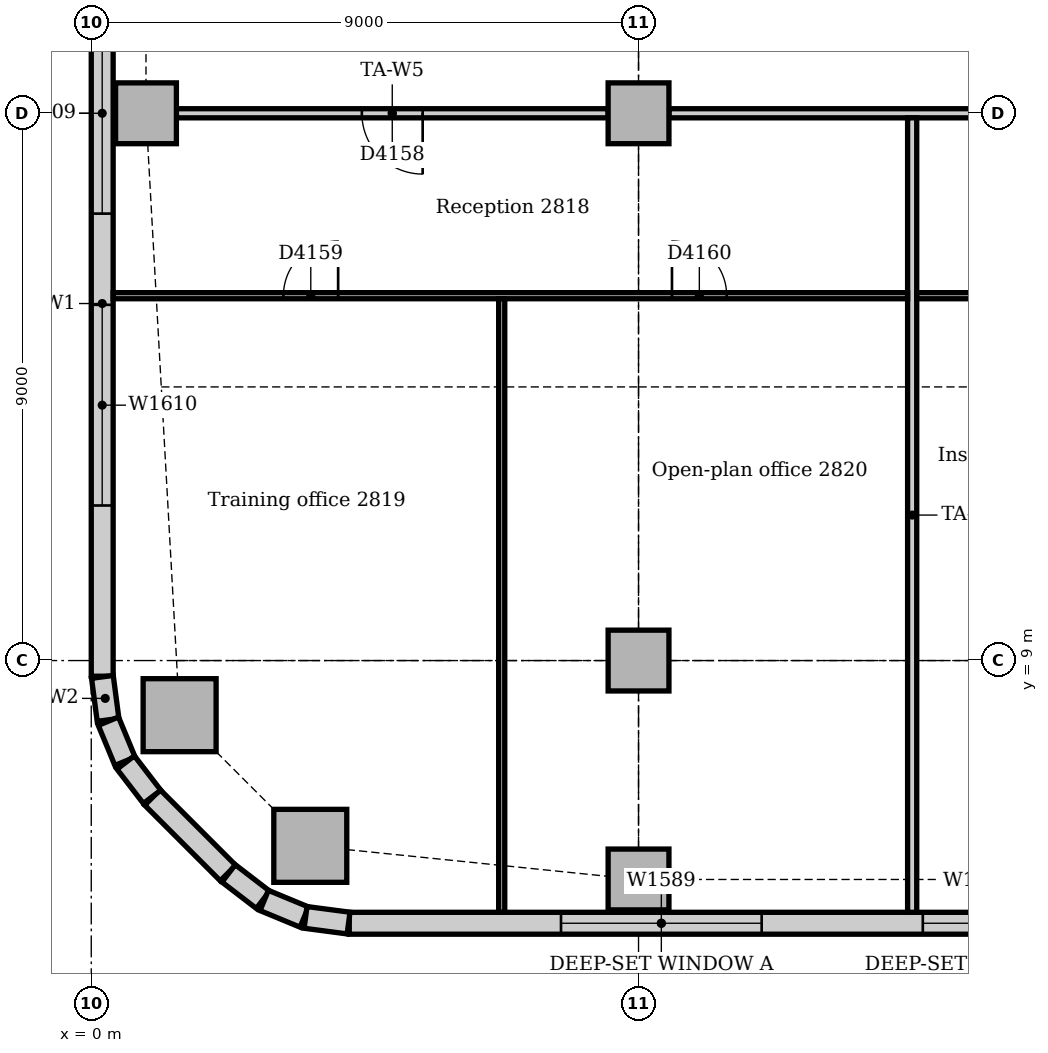
"""IFC4 building model, lengths in metres.
Left out: names, types, materials, properties, quantities, classifications, styles, units other than length and angle.
Written with IfcOpenShell. Run it as: python <this file> out.ifc"""

import sys

from ifc_helpers import new_model, si_unit, direction, frame, frame_2d, origin, origin_2d, place, context, subcontext, project, spatial, rectangle, extrude, element, fill, save


model = new_model("IFC4")
c1 = context("Model", 3, precision=1e-05, world=origin(), true_north=direction((0.0, 1.0)))
c2 = subcontext(c1, "Body", "Model", "MODEL_VIEW")
j1 = project(units=[si_unit("LENGTHUNIT", "METRE"), si_unit("PLANEANGLEUNIT", "RADIAN")], contexts=[c1])
p1 = place(None, origin())
s1 = spatial("IfcSite", under=j1, at=p1, CompositionType="ELEMENT")
p2 = place(p1, origin())
s2 = spatial("IfcBuilding", under=s1, at=p2, CompositionType="ELEMENT")
p3 = place(p2, frame((0.0, 0.0, 120.0)))
s3 = spatial("IfcBuildingStorey", under=s2, at=p3, CompositionType="ELEMENT", Elevation=120.0)
for number, where, z_axis, x_axis in (
    (1, (3.602, 5.953, 0.0), (0.0, 0.0, 1.0), (1.0, 0.0, 0.0)),
    (2, (1.453, 8.102, 0.0), (0.0, 0.0, 1.0), (1.0, 0.0, 0.0)),
):
    element("IfcColumn", number, at=place(p3, frame(where, z_axis=z_axis, x_axis=x_axis)), inside=s3, PredefinedType="COLUMN", context=c2, shape_type="SweptSolid", body=[
        extrude(rectangle(XDim=1.2, YDim=1.2, at=origin_2d()), origin(), (0.0, 0.0, 1.0), 3.85),
    ])
for number, where, z_axis, x_axis in (
    (3, (9.0, 5.4, 0.0), (0.0, 0.0, 1.0), (1.0, 0.0, 0.0)),
    (4, (0.9, 18.0, 0.0), (0.0, 0.0, 1.0), (1.0, 0.0, 0.0)),
    (5, (9.0, 9.0, 0.0), (0.0, 0.0, 1.0), (1.0, 0.0, 0.0)),
    (6, (9.0, 18.0, 0.0), (0.0, 0.0, 1.0), (1.0, 0.0, 0.0)),
):
    element("IfcColumn", number, at=place(p3, frame(where, z_axis=z_axis, x_axis=x_axis)), inside=s3, PredefinedType="COLUMN", context=c2, shape_type="SweptSolid", body=[
        extrude(rectangle(XDim=1.0, YDim=1.0, at=origin_2d()), origin(), (0.0, 0.0, 1.0), 3.85),
    ])
p4 = place(p3, frame((4.243, 4.68, 0.0), z_axis=(0.0, 0.0, 1.0), x_axis=(1.0, 0.0, 0.0)))
e7 = element("IfcWall", 7, at=p4, inside=s3, PredefinedType="STANDARD", context=c2, shape_type="SweptSolid", body=[
    extrude(rectangle(XDim=37.265, YDim=0.36, at=frame_2d((18.632, 0.0))), origin(), (0.0, 0.0, 1.0), 3.85),
])
p5 = place(p4, frame((3.482, 0.0, 0.9)))
e8 = element("IfcOpeningElement", 8, at=p5, cuts=e7, PredefinedType="OPENING", context=c2, shape_type="SweptSolid", body=[
    extrude(rectangle(XDim=3.3, YDim=1.6, at=frame_2d((1.65, 0.8))), frame((0.0, 0.19, 0.0), z_axis=(0.0, -1.0, 0.0), x_axis=(1.0, 0.0, 0.0)), (0.0, 0.0, 1.0), 0.38),
])
p6 = place(p4, frame((9.432, 0.0, 0.9)))
e9 = element("IfcOpeningElement", 9, at=p6, cuts=e7, PredefinedType="OPENING", context=c2, shape_type="SweptSolid", body=[
    extrude(rectangle(XDim=1.8, YDim=1.6, at=frame_2d((0.9, 0.8))), frame((0.0, 0.19, 0.0), z_axis=(0.0, -1.0, 0.0), x_axis=(1.0, 0.0, 0.0)), (0.0, 0.0, 1.0), 0.38),
])
p7 = place(p4, frame((12.482, 0.0, 0.9)))
e10 = element("IfcOpeningElement", 10, at=p7, cuts=e7, PredefinedType="OPENING", context=c2, shape_type="SweptSolid", body=[
    extrude(rectangle(XDim=3.3, YDim=1.6, at=frame_2d((1.65, 0.8))), frame((0.0, 0.19, 0.0), z_axis=(0.0, -1.0, 0.0), x_axis=(1.0, 0.0, 0.0)), (0.0, 0.0, 1.0), 0.38),
])
p8 = place(p4, frame((18.482, 0.0, 0.9)))
e11 = element("IfcOpeningElement", 11, at=p8, cuts=e7, PredefinedType="OPENING", context=c2, shape_type="SweptSolid", body=[
    extrude(rectangle(XDim=1.8, YDim=1.6, at=frame_2d((0.9, 0.8))), frame((0.0, 0.19, 0.0), z_axis=(0.0, -1.0, 0.0), x_axis=(1.0, 0.0, 0.0)), (0.0, 0.0, 1.0), 0.38),
])
p9 = place(p4, frame((21.482, 0.0, 0.9)))
e12 = element("IfcOpeningElement", 12, at=p9, cuts=e7, PredefinedType="OPENING", context=c2, shape_type="SweptSolid", body=[
    extrude(rectangle(XDim=3.3, YDim=1.6, at=frame_2d((1.65, 0.8))), frame((0.0, 0.19, 0.0), z_axis=(0.0, -1.0, 0.0), x_axis=(1.0, 0.0, 0.0)), (0.0, 0.0, 1.0), 0.38),
])
p10 = place(p4, frame((25.982, 0.0, 0.9)))
e13 = element("IfcOpeningElement", 13, at=p10, cuts=e7, PredefinedType="OPENING", context=c2, shape_type="SweptSolid", body=[
    extrude(rectangle(XDim=3.3, YDim=1.6, at=frame_2d((1.65, 0.8))), frame((0.0, 0.19, 0.0), z_axis=(0.0, -1.0, 0.0), x_axis=(1.0, 0.0, 0.0)), (0.0, 0.0, 1.0), 0.38),
])
p11 = place(p4, frame((30.482, 0.0, 0.9)))
e14 = element("IfcOpeningElement", 14, at=p11, cuts=e7, PredefinedType="OPENING", context=c2, shape_type="SweptSolid", body=[
    extrude(rectangle(XDim=3.3, YDim=1.6, at=frame_2d((1.65, 0.8))), frame((0.0, 0.19, 0.0), z_axis=(0.0, -1.0, 0.0), x_axis=(1.0, 0.0, 0.0)), (0.0, 0.0, 1.0), 0.38),
])
p12 = place(p3, frame((0.18, 21.0, 0.0), z_axis=(0.0, 0.0, 1.0), x_axis=(0.0, -1.0, 0.0)))
e15 = element("IfcWall", 15, at=p12, inside=s3, PredefinedType="STANDARD", context=c2, shape_type="SweptSolid", body=[
    extrude(rectangle(XDim=12.257, YDim=0.36, at=frame_2d((6.129, 0.0))), origin(), (0.0, 0.0, 1.0), 3.85),
])
p13 = place(p12, frame((1.35, 0.0, 0.9)))
e16 = element("IfcOpeningElement", 16, at=p13, cuts=e15, PredefinedType="OPENING", context=c2, shape_type="SweptSolid", body=[
    extrude(rectangle(XDim=3.3, YDim=1.6, at=frame_2d((1.65, 0.8))), frame((0.0, 0.19, 0.0), z_axis=(0.0, -1.0, 0.0), x_axis=(1.0, 0.0, 0.0)), (0.0, 0.0, 1.0), 0.38),
])
p14 = place(p12, frame((6.15, 0.0, 0.9)))
e17 = element("IfcOpeningElement", 17, at=p14, cuts=e15, PredefinedType="OPENING", context=c2, shape_type="SweptSolid", body=[
    extrude(rectangle(XDim=3.3, YDim=1.6, at=frame_2d((1.65, 0.8))), frame((0.0, 0.19, 0.0), z_axis=(0.0, -1.0, 0.0), x_axis=(1.0, 0.0, 0.0)), (0.0, 0.0, 1.0), 0.38),
])
p15 = place(p3, frame((1.006, 6.749, 0.0), z_axis=(0.0, 0.0, 1.0), x_axis=(0.707106781187, -0.707106781187, 0.0)))
e18 = element("IfcWall", 18, at=p15, inside=s3, PredefinedType="STANDARD", context=c2, shape_type="SweptSolid", body=[
    extrude(rectangle(XDim=1.757, YDim=0.36, at=frame_2d((0.879, 0.0))), origin(), (0.0, 0.0, 1.0), 3.85),
])
for number, where, z_axis, x_axis in (
    (19, (0.183, 8.731, 0.0), (0.0, 0.0, 1.0), (0.131, -0.991, 0.0)),
    (20, (0.282, 8.003, 0.0), (0.0, 0.0, 1.0), (0.383, -0.924, 0.0)),
):
    element("IfcWall", number, at=place(p3, frame(where, z_axis=z_axis, x_axis=x_axis)), inside=s3, PredefinedType="STANDARD", context=c2, shape_type="SweptSolid", body=[
        extrude(rectangle(XDim=0.713, YDim=0.36, at=frame_2d((0.356, 0.0))), origin(), (0.0, 0.0, 1.0), 3.85),
    ])
for number, where, z_axis, x_axis in (
    (21, (0.566, 7.324, 0.0), (0.0, 0.0, 1.0), (0.609, -0.793, 0.0)),
    (22, (2.259, 5.5, 0.0), (0.0, 0.0, 1.0), (0.793, -0.609, 0.0)),
):
    element("IfcWall", number, at=place(p3, frame(where, z_axis=z_axis, x_axis=x_axis)), inside=s3, PredefinedType="STANDARD", context=c2, shape_type="SweptSolid", body=[
        extrude(rectangle(XDim=0.713, YDim=0.36, at=frame_2d((0.357, 0.0))), origin(), (0.0, 0.0, 1.0), 3.85),
    ])
for number, where, z_axis, x_axis in (
    (23, (2.844, 5.055, 0.0), (0.0, 0.0, 1.0), (0.924, -0.383, 0.0)),
    (24, (3.524, 4.776, 0.0), (0.0, 0.0, 1.0), (0.991, -0.131, 0.0)),
):
    element("IfcWall", number, at=place(p3, frame(where, z_axis=z_axis, x_axis=x_axis)), inside=s3, PredefinedType="STANDARD", context=c2, shape_type="SweptSolid", body=[
        extrude(rectangle(XDim=0.713, YDim=0.36, at=frame_2d((0.356, 0.0))), origin(), (0.0, 0.0, 1.0), 3.85),
    ])
p16 = place(p3, frame((9.5, 18.0, 0.0), z_axis=(0.0, 0.0, 1.0), x_axis=(1.0, 0.0, 0.0)))
e25 = element("IfcWall", 25, at=p16, inside=s3, PredefinedType="PARTITIONING", context=c2, shape_type="SweptSolid", body=[
    extrude(rectangle(XDim=8.0, YDim=0.15, at=frame_2d((4.0, 0.0))), origin(), (0.0, 0.0, 1.0), 3.158),
])
p17 = place(p3, frame((1.4, 18.0, 0.0), z_axis=(0.0, 0.0, 1.0), x_axis=(1.0, 0.0, 0.0)))
e26 = element("IfcWall", 26, at=p17, inside=s3, PredefinedType="PARTITIONING", context=c2, shape_type="SweptSolid", body=[
    extrude(rectangle(XDim=7.1, YDim=0.15, at=frame_2d((3.55, 0.0))), origin(), (0.0, 0.0, 1.0), 3.158),
])
p18 = place(p17, frame((3.05, 0.0, 0.0)))
e27 = element("IfcOpeningElement", 27, at=p18, cuts=e26, PredefinedType="OPENING", context=c2, shape_type="SweptSolid", body=[
    extrude(rectangle(XDim=1.0, YDim=2.1, at=frame_2d((0.5, 1.05))), frame((0.0, 0.085, 0.0), z_axis=(0.0, -1.0, 0.0), x_axis=(1.0, 0.0, 0.0)), (0.0, 0.0, 1.0), 0.17),
])
p19 = place(p3, frame((13.5, 4.86, 0.0), z_axis=(0.0, 0.0, 1.0), x_axis=(0.0, 1.0, 0.0)))
e28 = element("IfcWall", 28, at=p19, inside=s3, PredefinedType="PARTITIONING", context=c2, shape_type="SweptSolid", body=[
    extrude(rectangle(XDim=13.065, YDim=0.15, at=frame_2d((6.532, 0.0))), origin(), (0.0, 0.0, 1.0), 3.85),
])
p20 = place(p3, frame((13.575, 15.0, 0.0), z_axis=(0.0, 0.0, 1.0), x_axis=(1.0, 0.0, 0.0)))
e29 = element("IfcWall", 29, at=p20, inside=s3, PredefinedType="PARTITIONING", context=c2, shape_type="SweptSolid", body=[
    extrude(rectangle(XDim=8.85, YDim=0.1, at=frame_2d((4.425, 0.0))), origin(), (0.0, 0.0, 1.0), 3.85),
])
p21 = place(p20, frame((1.85, 0.0, 0.0)))
e30 = element("IfcOpeningElement", 30, at=p21, cuts=e29, PredefinedType="OPENING", context=c2, shape_type="SweptSolid", body=[
    extrude(rectangle(XDim=0.9, YDim=2.1, at=frame_2d((0.45, 1.05))), frame((0.0, 0.06, 0.0), z_axis=(0.0, -1.0, 0.0), x_axis=(1.0, 0.0, 0.0)), (0.0, 0.0, 1.0), 0.12),
])
p22 = place(p20, frame((6.125, 0.0, 0.0)))
e31 = element("IfcOpeningElement", 31, at=p22, cuts=e29, PredefinedType="OPENING", context=c2, shape_type="SweptSolid", body=[
    extrude(rectangle(XDim=0.9, YDim=2.1, at=frame_2d((0.45, 1.05))), frame((0.0, 0.06, 0.0), z_axis=(0.0, -1.0, 0.0), x_axis=(1.0, 0.0, 0.0)), (0.0, 0.0, 1.0), 0.12),
])
p23 = place(p3, frame((0.36, 15.0, 0.0), z_axis=(0.0, 0.0, 1.0), x_axis=(1.0, 0.0, 0.0)))
e32 = element("IfcWall", 32, at=p23, inside=s3, PredefinedType="PARTITIONING", context=c2, shape_type="SweptSolid", body=[
    extrude(rectangle(XDim=13.065, YDim=0.1, at=frame_2d((6.532, 0.0))), origin(), (0.0, 0.0, 1.0), 3.85),
])
p24 = place(p23, frame((2.8, 0.0, 0.0)))
e33 = element("IfcOpeningElement", 33, at=p24, cuts=e32, PredefinedType="OPENING", context=c2, shape_type="SweptSolid", body=[
    extrude(rectangle(XDim=0.9, YDim=2.1, at=frame_2d((0.45, 1.05))), frame((0.0, 0.06, 0.0), z_axis=(0.0, -1.0, 0.0), x_axis=(1.0, 0.0, 0.0)), (0.0, 0.0, 1.0), 0.12),
])
p25 = place(p23, frame((9.19, 0.0, 0.0)))
e34 = element("IfcOpeningElement", 34, at=p25, cuts=e32, PredefinedType="OPENING", context=c2, shape_type="SweptSolid", body=[
    extrude(rectangle(XDim=0.9, YDim=2.1, at=frame_2d((0.45, 1.05))), frame((0.0, 0.06, 0.0), z_axis=(0.0, -1.0, 0.0), x_axis=(1.0, 0.0, 0.0)), (0.0, 0.0, 1.0), 0.12),
])
p26 = place(p3, frame((6.75, 4.86, 0.0), z_axis=(0.0, 0.0, 1.0), x_axis=(0.0, 1.0, 0.0)))
e35 = element("IfcWall", 35, at=p26, inside=s3, PredefinedType="PARTITIONING", context=c2, shape_type="SweptSolid", body=[
    extrude(rectangle(XDim=10.09, YDim=0.1, at=frame_2d((5.045, 0.0))), origin(), (0.0, 0.0, 1.0), 3.85),
])
p27 = place(p5, origin())
e36 = element("IfcWindow", 36, at=p27, inside=s3, PartitioningType="SINGLE_PANEL", PredefinedType="WINDOW", context=c2, shape_type="SweptSolid", body=[
    extrude(rectangle(XDim=3.3, YDim=1.6, at=frame_2d((1.65, 0.8))), frame((0.0, 0.13, 0.0), z_axis=(0.0, -1.0, 0.0), x_axis=(1.0, 0.0, 0.0)), (0.0, 0.0, 1.0), 0.06),
])
fill(e8, e36)
p28 = place(p6, origin())
e37 = element("IfcWindow", 37, at=p28, inside=s3, PartitioningType="SINGLE_PANEL", PredefinedType="WINDOW", context=c2, shape_type="SweptSolid", body=[
    extrude(rectangle(XDim=1.8, YDim=1.6, at=frame_2d((0.9, 0.8))), frame((0.0, 0.13, 0.0), z_axis=(0.0, -1.0, 0.0), x_axis=(1.0, 0.0, 0.0)), (0.0, 0.0, 1.0), 0.06),
])
fill(e9, e37)
p29 = place(p13, origin())
e38 = element("IfcWindow", 38, at=p29, inside=s3, PartitioningType="SINGLE_PANEL", PredefinedType="WINDOW", context=c2, shape_type="SweptSolid", body=[
    extrude(rectangle(XDim=3.3, YDim=1.6, at=frame_2d((1.65, 0.8))), frame((0.0, 0.13, 0.0), z_axis=(0.0, -1.0, 0.0), x_axis=(1.0, 0.0, 0.0)), (0.0, 0.0, 1.0), 0.06),
])
fill(e16, e38)
p30 = place(p14, origin())
e39 = element("IfcWindow", 39, at=p30, inside=s3, PartitioningType="SINGLE_PANEL", PredefinedType="WINDOW", context=c2, shape_type="SweptSolid", body=[
    extrude(rectangle(XDim=3.3, YDim=1.6, at=frame_2d((1.65, 0.8))), frame((0.0, 0.13, 0.0), z_axis=(0.0, -1.0, 0.0), x_axis=(1.0, 0.0, 0.0)), (0.0, 0.0, 1.0), 0.06),
])
fill(e17, e39)
p31 = place(p18, frame((1.0, 0.0, 0.0), z_axis=(0.0, 0.0, 1.0), x_axis=(-1.0, 0.0, 0.0)))
e40 = element("IfcDoor", 40, at=p31, inside=s3, OperationType="SINGLE_SWING_LEFT", PredefinedType="DOOR", context=c2, shape_type="SweptSolid", body=[
    extrude(rectangle(XDim=1.0, YDim=2.1, at=frame_2d((0.5, 1.05))), frame((0.0, 0.025, 0.0), z_axis=(0.0, -1.0, 0.0), x_axis=(1.0, 0.0, 0.0)), (0.0, 0.0, 1.0), 0.05),
])
fill(e27, e40)
p32 = place(p24, origin())
e41 = element("IfcDoor", 41, at=p32, inside=s3, OperationType="SINGLE_SWING_RIGHT", PredefinedType="DOOR", context=c2, shape_type="SweptSolid", body=[
    extrude(rectangle(XDim=0.9, YDim=2.1, at=frame_2d((0.45, 1.05))), frame((0.0, 0.025, 0.0), z_axis=(0.0, -1.0, 0.0), x_axis=(1.0, 0.0, 0.0)), (0.0, 0.0, 1.0), 0.05),
])
fill(e33, e41)
p33 = place(p25, origin())
e42 = element("IfcDoor", 42, at=p33, inside=s3, OperationType="SINGLE_SWING_LEFT", PredefinedType="DOOR", context=c2, shape_type="SweptSolid", body=[
    extrude(rectangle(XDim=0.9, YDim=2.1, at=frame_2d((0.45, 1.05))), frame((0.0, 0.025, 0.0), z_axis=(0.0, -1.0, 0.0), x_axis=(1.0, 0.0, 0.0)), (0.0, 0.0, 1.0), 0.05),
])
fill(e34, e42)
save(model, sys.argv[1])
